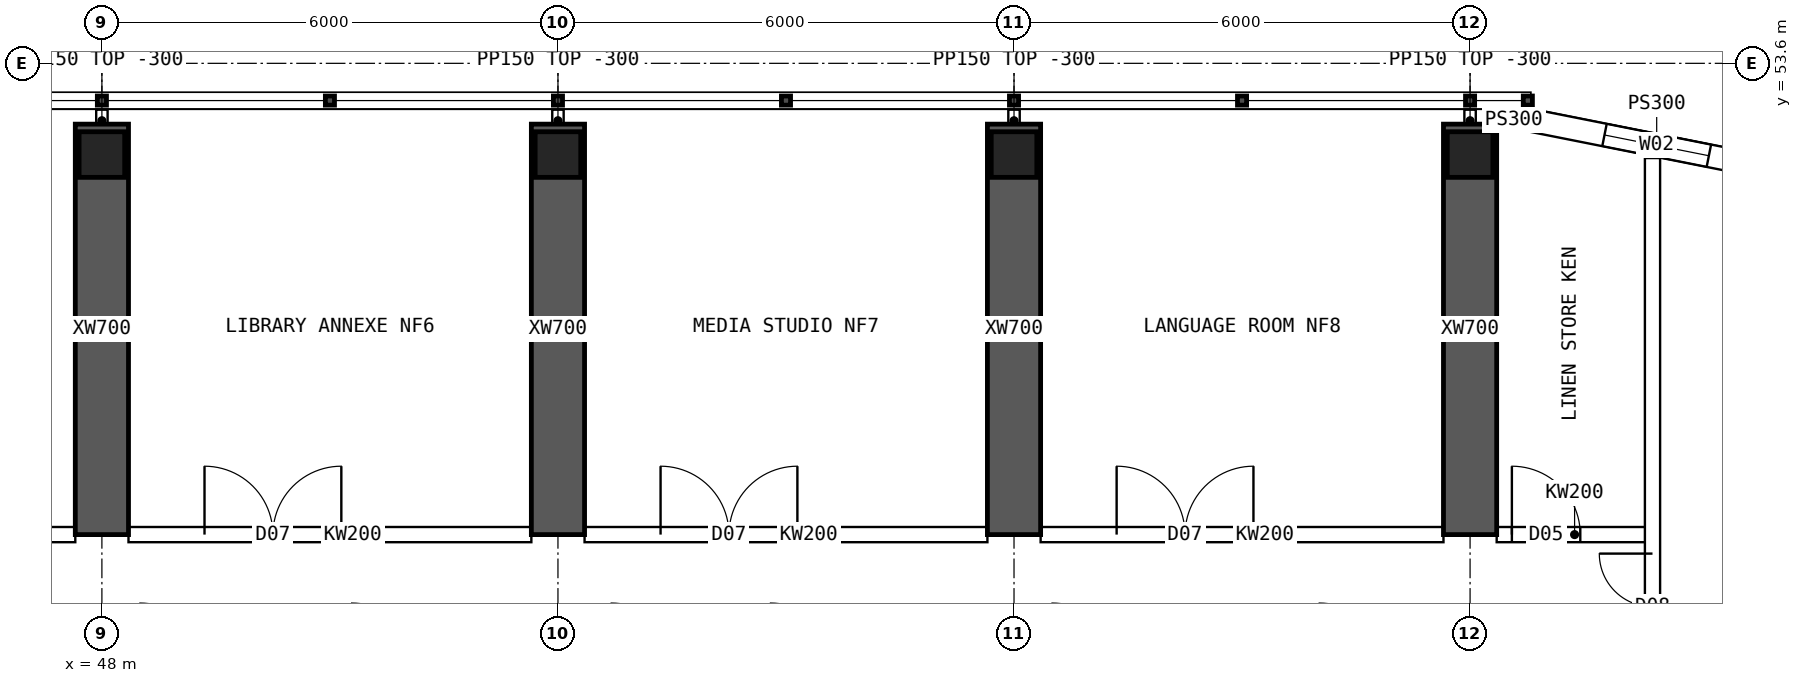
"""IFC4 building model, lengths in metres.
Left out: names, types, materials, properties, quantities, classifications, styles, units other than length and angle.
Written with IfcOpenShell. Run it as: python <this file> out.ifc"""

import sys

from ifc_helpers import new_model, si_unit, direction, frame, frame_2d, origin, origin_2d, place, context, subcontext, project, spatial, polyline, rectangle, hollow_rectangle, outline, extrude, element, fill, save


model = new_model("IFC4")
c1 = context("Model", 3, precision=1e-05, world=origin(), true_north=direction((0.0, 1.0)))
c2 = subcontext(c1, "Body", "Model", "MODEL_VIEW")
j1 = project(units=[si_unit("LENGTHUNIT", "METRE"), si_unit("PLANEANGLEUNIT", "RADIAN")], contexts=[c1])
p1 = place(None, origin())
s1 = spatial("IfcSite", under=j1, at=p1, CompositionType="ELEMENT")
p2 = place(p1, origin())
s2 = spatial("IfcBuilding", under=s1, at=p2, CompositionType="ELEMENT")
p3 = place(p2, frame((0.0, 0.0, 257.8)))
s3 = spatial("IfcBuildingStorey", under=s2, at=p3, CompositionType="ELEMENT", Elevation=257.8)
for number, where, z_axis, x_axis in (
    (1, (48.0, 52.4, 0.0), (0.0, 0.0, 1.0), (1.0, 0.0, 0.0)),
    (2, (54.0, 52.4, 0.0), (0.0, 0.0, 1.0), (1.0, 0.0, 0.0)),
    (3, (60.0, 52.4, 0.0), (0.0, 0.0, 1.0), (1.0, 0.0, 0.0)),
    (4, (66.0, 52.4, 0.0), (0.0, 0.0, 1.0), (1.0, 0.0, 0.0)),
):
    element("IfcColumn", number, at=place(p3, frame(where, z_axis=z_axis, x_axis=x_axis)), inside=s3, PredefinedType="COLUMN", context=c2, shape_type="SweptSolid", body=[
        extrude(hollow_rectangle(XDim=0.6, YDim=0.6, WallThickness=0.06, at=origin_2d()), origin(), (0.0, 0.0, 1.0), 4.5),
    ])
for number, where, z_axis, x_axis in (
    (5, (48.0, 47.4, 0.0), (0.0, 0.0, 1.0), (0.0, 1.0, 0.0)),
    (6, (54.0, 47.4, 0.0), (0.0, 0.0, 1.0), (0.0, 1.0, 0.0)),
    (7, (60.0, 47.4, 0.0), (0.0, 0.0, 1.0), (0.0, 1.0, 0.0)),
    (8, (66.0, 47.4, 0.0), (0.0, 0.0, 1.0), (0.0, 1.0, 0.0)),
):
    element("IfcWall", number, at=place(p3, frame(where, z_axis=z_axis, x_axis=x_axis)), inside=s3, PredefinedType="SHEAR", context=c2, shape_type="SweptSolid", body=[
        extrude(rectangle(XDim=5.4, YDim=0.7, at=frame_2d((2.7, 0.0))), origin(), (0.0, 0.0, 1.0), 4.5),
    ])
p4 = place(p3, frame((70.11, 52.192, 0.0), z_axis=(0.0, 0.0, 1.0), x_axis=(-0.98078325777, 0.195100490205, 0.0)))
e9 = element("IfcWall", 9, at=p4, inside=s3, PredefinedType="SOLIDWALL", context=c2, shape_type="SweptSolid", body=[
    extrude(outline(polyline([(-0.03, -0.15), (3.405, -0.15), (3.345, 0.15), (0.03, 0.15), (-0.03, -0.15)])), origin(), (0.0, 0.0, 1.0), 4.2),
])
p5 = place(p4, frame((0.988, 0.0, 0.9)))
e10 = element("IfcOpeningElement", 10, at=p5, cuts=e9, PredefinedType="OPENING", context=c2, shape_type="SweptSolid", body=[
    extrude(rectangle(XDim=1.4, YDim=1.8, at=frame_2d((0.7, 0.9))), frame((0.0, 0.16, 0.0), z_axis=(0.0, -1.0, 0.0), x_axis=(1.0, 0.0, 0.0)), (0.0, 0.0, 1.0), 0.32),
])
p6 = place(p3, frame((66.8, 52.85, 0.0), z_axis=(0.0, 0.0, 1.0), x_axis=(-1.0, 0.0, 0.0)))
e11 = element("IfcWall", 11, at=p6, inside=s3, PredefinedType="SOLIDWALL", context=c2, shape_type="SweptSolid", body=[
    extrude(rectangle(XDim=0.45, YDim=0.3, at=frame_2d((0.225, 0.0))), origin(), (0.0, 0.0, 1.0), 4.2),
])
p7 = place(p3, frame((42.35, 47.4, 0.0), z_axis=(0.0, 0.0, 1.0), x_axis=(1.0, 0.0, 0.0)))
e12 = element("IfcWall", 12, at=p7, inside=s3, PredefinedType="SOLIDWALL", context=c2, shape_type="SweptSolid", body=[
    extrude(rectangle(XDim=5.3, YDim=0.2, at=frame_2d((2.65, 0.0))), origin(), (0.0, 0.0, 1.0), 4.2),
])
p8 = place(p7, frame((1.0, 0.0, 0.0)))
e13 = element("IfcOpeningElement", 13, at=p8, cuts=e12, PredefinedType="OPENING", context=c2, shape_type="SweptSolid", body=[
    extrude(rectangle(XDim=1.8, YDim=2.1, at=frame_2d((0.9, 1.05))), frame((0.0, 0.11, 0.0), z_axis=(0.0, -1.0, 0.0), x_axis=(1.0, 0.0, 0.0)), (0.0, 0.0, 1.0), 0.22),
])
p9 = place(p3, frame((48.35, 47.4, 0.0), z_axis=(0.0, 0.0, 1.0), x_axis=(1.0, 0.0, 0.0)))
e14 = element("IfcWall", 14, at=p9, inside=s3, PredefinedType="SOLIDWALL", context=c2, shape_type="SweptSolid", body=[
    extrude(rectangle(XDim=5.3, YDim=0.2, at=frame_2d((2.65, 0.0))), origin(), (0.0, 0.0, 1.0), 4.2),
])
p10 = place(p9, frame((1.0, 0.0, 0.0)))
e15 = element("IfcOpeningElement", 15, at=p10, cuts=e14, PredefinedType="OPENING", context=c2, shape_type="SweptSolid", body=[
    extrude(rectangle(XDim=1.8, YDim=2.1, at=frame_2d((0.9, 1.05))), frame((0.0, 0.11, 0.0), z_axis=(0.0, -1.0, 0.0), x_axis=(1.0, 0.0, 0.0)), (0.0, 0.0, 1.0), 0.22),
])
p11 = place(p3, frame((54.35, 47.4, 0.0), z_axis=(0.0, 0.0, 1.0), x_axis=(1.0, 0.0, 0.0)))
e16 = element("IfcWall", 16, at=p11, inside=s3, PredefinedType="SOLIDWALL", context=c2, shape_type="SweptSolid", body=[
    extrude(rectangle(XDim=5.3, YDim=0.2, at=frame_2d((2.65, 0.0))), origin(), (0.0, 0.0, 1.0), 4.2),
])
p12 = place(p11, frame((1.0, 0.0, 0.0)))
e17 = element("IfcOpeningElement", 17, at=p12, cuts=e16, PredefinedType="OPENING", context=c2, shape_type="SweptSolid", body=[
    extrude(rectangle(XDim=1.8, YDim=2.1, at=frame_2d((0.9, 1.05))), frame((0.0, 0.11, 0.0), z_axis=(0.0, -1.0, 0.0), x_axis=(1.0, 0.0, 0.0)), (0.0, 0.0, 1.0), 0.22),
])
p13 = place(p3, frame((60.35, 47.4, 0.0), z_axis=(0.0, 0.0, 1.0), x_axis=(1.0, 0.0, 0.0)))
e18 = element("IfcWall", 18, at=p13, inside=s3, PredefinedType="SOLIDWALL", context=c2, shape_type="SweptSolid", body=[
    extrude(rectangle(XDim=5.3, YDim=0.2, at=frame_2d((2.65, 0.0))), origin(), (0.0, 0.0, 1.0), 4.2),
])
p14 = place(p13, frame((1.0, 0.0, 0.0)))
e19 = element("IfcOpeningElement", 19, at=p14, cuts=e18, PredefinedType="OPENING", context=c2, shape_type="SweptSolid", body=[
    extrude(rectangle(XDim=1.8, YDim=2.1, at=frame_2d((0.9, 1.05))), frame((0.0, 0.11, 0.0), z_axis=(0.0, -1.0, 0.0), x_axis=(1.0, 0.0, 0.0)), (0.0, 0.0, 1.0), 0.22),
])
p15 = place(p3, frame((66.35, 47.4, 0.0), z_axis=(0.0, 0.0, 1.0), x_axis=(1.0, 0.0, 0.0)))
e20 = element("IfcWall", 20, at=p15, inside=s3, PredefinedType="SOLIDWALL", context=c2, shape_type="SweptSolid", body=[
    extrude(rectangle(XDim=2.05, YDim=0.2, at=frame_2d((1.025, 0.0))), origin(), (0.0, 0.0, 1.0), 4.2),
])
p16 = place(p15, frame((0.2, 0.0, 0.0)))
e21 = element("IfcOpeningElement", 21, at=p16, cuts=e20, PredefinedType="OPENING", context=c2, shape_type="SweptSolid", body=[
    extrude(rectangle(XDim=0.9, YDim=2.1, at=frame_2d((0.45, 1.05))), frame((0.0, 0.11, 0.0), z_axis=(0.0, -1.0, 0.0), x_axis=(1.0, 0.0, 0.0)), (0.0, 0.0, 1.0), 0.22),
])
p17 = place(p3, frame((68.4, 11.646, 0.0), z_axis=(0.0, 0.0, 1.0), x_axis=(0.0, 1.0, 0.0)))
e22 = element("IfcWall", 22, at=p17, inside=s3, PredefinedType="SOLIDWALL", context=c2, shape_type="SweptSolid", body=[
    extrude(rectangle(XDim=40.708, YDim=0.2, at=frame_2d((20.354, 0.0))), origin(), (0.0, 0.0, 1.0), 4.2),
])
p18 = place(p17, frame((5.104, 0.0, 0.0)))
e23 = element("IfcOpeningElement", 23, at=p18, cuts=e22, PredefinedType="OPENING", context=c2, shape_type="SweptSolid", body=[
    extrude(rectangle(XDim=1.4, YDim=2.1, at=frame_2d((0.7, 1.05))), frame((0.0, 0.11, 0.0), z_axis=(0.0, -1.0, 0.0), x_axis=(1.0, 0.0, 0.0)), (0.0, 0.0, 1.0), 0.22),
])
p19 = place(p17, frame((34.104, 0.0, 0.0)))
e24 = element("IfcOpeningElement", 24, at=p19, cuts=e22, PredefinedType="OPENING", context=c2, shape_type="SweptSolid", body=[
    extrude(rectangle(XDim=1.4, YDim=2.1, at=frame_2d((0.7, 1.05))), frame((0.0, 0.11, 0.0), z_axis=(0.0, -1.0, 0.0), x_axis=(1.0, 0.0, 0.0)), (0.0, 0.0, 1.0), 0.22),
])
for number, where, z_axis, x_axis in (
    (25, (48.0, 52.7, 0.0), (0.0, 0.0, 1.0), (0.0, 1.0, 0.0)),
    (26, (54.0, 52.7, 0.0), (0.0, 0.0, 1.0), (0.0, 1.0, 0.0)),
    (27, (60.0, 52.7, 0.0), (0.0, 0.0, 1.0), (0.0, 1.0, 0.0)),
    (28, (66.0, 52.7, 0.0), (0.0, 0.0, 1.0), (0.0, 1.0, 0.0)),
):
    element("IfcWall", number, at=place(p3, frame(where, z_axis=z_axis, x_axis=x_axis)), inside=s3, PredefinedType="PARTITIONING", context=c2, shape_type="SweptSolid", body=[
        extrude(rectangle(XDim=0.29, YDim=0.15, at=frame_2d((0.145, 0.0))), origin(), (0.0, 0.0, 1.0), 4.2),
    ])
p20 = place(p5, origin())
e29 = element("IfcWindow", 29, at=p20, inside=s3, PartitioningType="SINGLE_PANEL", PredefinedType="WINDOW", context=c2, shape_type="SweptSolid", body=[
    extrude(rectangle(XDim=1.4, YDim=1.8, at=frame_2d((0.7, 0.9))), frame((0.0, 0.03, 0.0), z_axis=(0.0, -1.0, 0.0), x_axis=(1.0, 0.0, 0.0)), (0.0, 0.0, 1.0), 0.06),
])
fill(e10, e29)
p21 = place(p10, origin())
e30 = element("IfcDoor", 30, at=p21, inside=s3, OperationType="DOUBLE_DOOR_SINGLE_SWING", PredefinedType="DOOR", context=c2, shape_type="SweptSolid", body=[
    extrude(rectangle(XDim=1.8, YDim=2.1, at=frame_2d((0.9, 1.05))), frame((0.0, 0.025, 0.0), z_axis=(0.0, -1.0, 0.0), x_axis=(1.0, 0.0, 0.0)), (0.0, 0.0, 1.0), 0.05),
])
fill(e15, e30)
p22 = place(p12, origin())
e31 = element("IfcDoor", 31, at=p22, inside=s3, OperationType="DOUBLE_DOOR_SINGLE_SWING", PredefinedType="DOOR", context=c2, shape_type="SweptSolid", body=[
    extrude(rectangle(XDim=1.8, YDim=2.1, at=frame_2d((0.9, 1.05))), frame((0.0, 0.025, 0.0), z_axis=(0.0, -1.0, 0.0), x_axis=(1.0, 0.0, 0.0)), (0.0, 0.0, 1.0), 0.05),
])
fill(e17, e31)
p23 = place(p14, origin())
e32 = element("IfcDoor", 32, at=p23, inside=s3, OperationType="DOUBLE_DOOR_SINGLE_SWING", PredefinedType="DOOR", context=c2, shape_type="SweptSolid", body=[
    extrude(rectangle(XDim=1.8, YDim=2.1, at=frame_2d((0.9, 1.05))), frame((0.0, 0.025, 0.0), z_axis=(0.0, -1.0, 0.0), x_axis=(1.0, 0.0, 0.0)), (0.0, 0.0, 1.0), 0.05),
])
fill(e19, e32)
p24 = place(p19, origin())
e33 = element("IfcDoor", 33, at=p24, inside=s3, OperationType="DOUBLE_DOOR_SINGLE_SWING", PredefinedType="DOOR", context=c2, shape_type="SweptSolid", body=[
    extrude(rectangle(XDim=1.4, YDim=2.1, at=frame_2d((0.7, 1.05))), frame((0.0, 0.025, 0.0), z_axis=(0.0, -1.0, 0.0), x_axis=(1.0, 0.0, 0.0)), (0.0, 0.0, 1.0), 0.05),
])
fill(e24, e33)
p25 = place(p16, origin())
e34 = element("IfcDoor", 34, at=p25, inside=s3, OperationType="SINGLE_SWING_LEFT", PredefinedType="DOOR", context=c2, shape_type="SweptSolid", body=[
    extrude(rectangle(XDim=0.9, YDim=2.1, at=frame_2d((0.45, 1.05))), frame((0.0, 0.025, 0.0), z_axis=(0.0, -1.0, 0.0), x_axis=(1.0, 0.0, 0.0)), (0.0, 0.0, 1.0), 0.05),
])
fill(e21, e34)
save(model, sys.argv[1])
